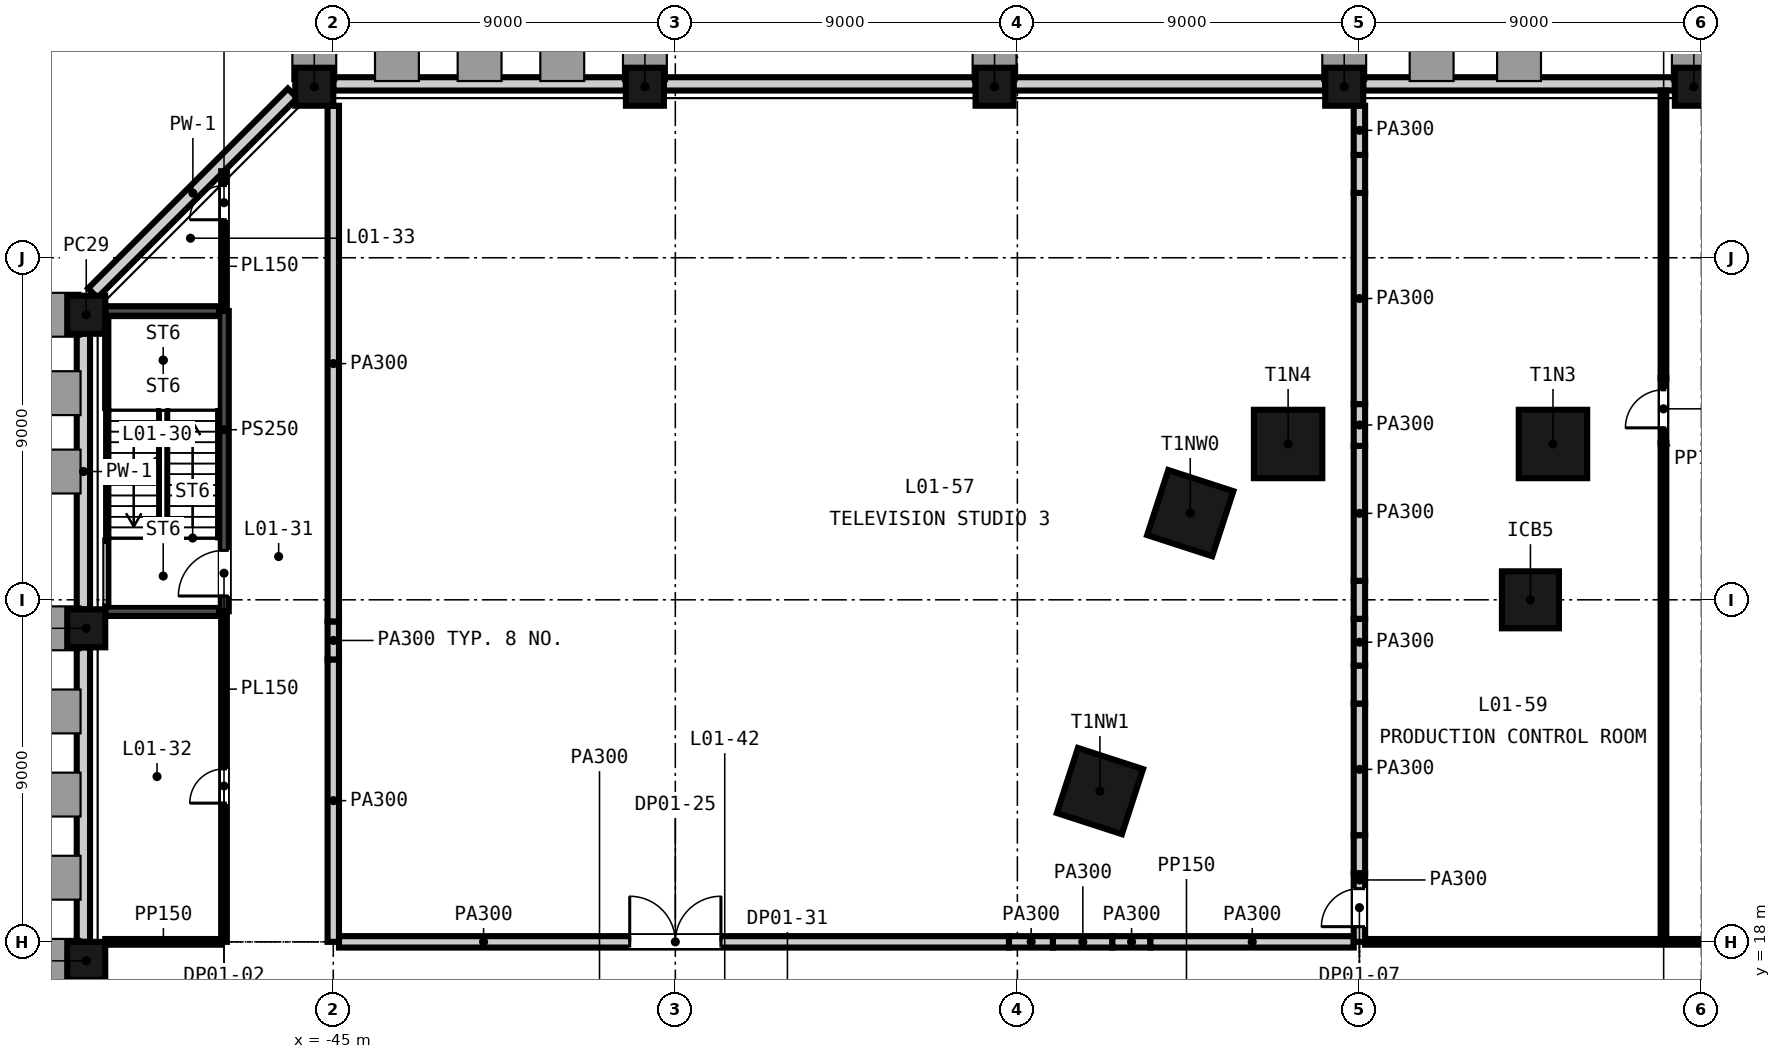
"""IFC4 building model, lengths in metres.
Left out: names, types, materials, properties, quantities, classifications, styles, units other than length and angle.
Written with IfcOpenShell. Run it as: python <this file> out.ifc"""

import sys

from ifc_helpers import new_model, si_unit, direction, frame, frame_2d, origin, origin_2d, place, context, subcontext, project, spatial, rectangle, extrude, element, fill, save


model = new_model("IFC4")
c1 = context("Model", 3, precision=1e-05, world=origin(), true_north=direction((0.0, 1.0)))
c2 = subcontext(c1, "Body", "Model", "MODEL_VIEW")
j1 = project(units=[si_unit("LENGTHUNIT", "METRE"), si_unit("PLANEANGLEUNIT", "RADIAN")], contexts=[c1])
p1 = place(None, origin())
s1 = spatial("IfcSite", under=j1, at=p1, CompositionType="ELEMENT")
p2 = place(p1, origin())
s2 = spatial("IfcBuilding", under=s1, at=p2, CompositionType="ELEMENT")
p3 = place(p2, frame((0.0, 0.0, 9.0)))
s3 = spatial("IfcBuildingStorey", under=s2, at=p3, CompositionType="ELEMENT", Elevation=9.0)
for number, where, z_axis, x_axis in (
    (1, (-12.907, 31.1, -0.4), (0.0, 0.0, 1.0), (-1.0, 0.0, 0.0)),
    (2, (-19.876, 31.1, -0.4), (0.0, 0.0, 1.0), (-1.0, 0.0, 0.0)),
    (3, (-22.451, 29.281, -0.4), (0.0, 0.0, 1.0), (-0.309, -0.951, 0.0)),
    (4, (-24.827, 21.968, -0.4), (0.0, 0.0, 1.0), (-0.309, -0.951, 0.0)),
):
    element("IfcColumn", number, at=place(p3, frame(where, z_axis=z_axis, x_axis=x_axis)), inside=s3, PredefinedType="COLUMN", context=c2, shape_type="SweptSolid", body=[
        extrude(rectangle(XDim=1.8, YDim=1.8, at=origin_2d()), origin(), (0.0, 0.0, 1.0), 9.0),
    ])
p4 = place(p3, frame((-13.5, 27.0, -0.4), z_axis=(0.0, 0.0, 1.0), x_axis=(1.0, 0.0, 0.0)))
e5 = element("IfcColumn", 5, at=p4, inside=s3, PredefinedType="COLUMN", context=c2, shape_type="SweptSolid", body=[
    extrude(rectangle(XDim=1.5, YDim=1.5, at=origin_2d()), origin(), (0.0, 0.0, 1.0), 9.0),
])
for number, where, z_axis, x_axis in (
    (6, (-9.2, 40.5, -0.4), (0.0, 0.0, 1.0), (-1.0, 0.0, 0.0)),
    (7, (-18.4, 40.5, -0.4), (0.0, 0.0, 1.0), (-1.0, 0.0, 0.0)),
    (8, (-27.6, 40.5, -0.4), (0.0, 0.0, 1.0), (-1.0, 0.0, 0.0)),
    (9, (-36.8, 40.5, -0.4), (0.0, 0.0, 1.0), (-1.0, 0.0, 0.0)),
    (10, (-45.5, 40.5, -0.4), (0.0, 0.0, 1.0), (-1.0, 0.0, 0.0)),
    (11, (-51.5, 34.5, -0.4), (0.0, 0.0, 1.0), (0.0, -1.0, 0.0)),
    (12, (-51.5, 26.25, -0.4), (0.0, 0.0, 1.0), (0.0, -1.0, 0.0)),
    (13, (-51.5, 17.5, -0.4), (0.0, 0.0, 1.0), (0.0, -1.0, 0.0)),
):
    element("IfcColumn", number, at=place(p3, frame(where, z_axis=z_axis, x_axis=x_axis)), inside=s3, PredefinedType="COLUMN", context=c2, shape_type="SweptSolid", body=[
        extrude(rectangle(XDim=1.0, YDim=1.0, at=origin_2d()), origin(), (0.0, 0.0, 1.0), 9.0),
    ])
p5 = place(p3, frame((-9.7, 40.575, -0.4), z_axis=(0.0, 0.0, 1.0), x_axis=(-1.0, 0.0, 0.0)))
e14 = element("IfcWall", 14, at=p5, inside=s3, PredefinedType="SOLIDWALL", context=c2, shape_type="SweptSolid", body=[
    extrude(rectangle(XDim=8.2, YDim=0.35, at=frame_2d((4.1, 0.0))), origin(), (0.0, 0.0, 1.0), 8.1),
])
p6 = place(p3, frame((-18.9, 40.575, -0.4), z_axis=(0.0, 0.0, 1.0), x_axis=(-1.0, 0.0, 0.0)))
e15 = element("IfcWall", 15, at=p6, inside=s3, PredefinedType="SOLIDWALL", context=c2, shape_type="SweptSolid", body=[
    extrude(rectangle(XDim=8.2, YDim=0.35, at=frame_2d((4.1, 0.0))), origin(), (0.0, 0.0, 1.0), 8.1),
])
p7 = place(p3, frame((-28.1, 40.575, -0.4), z_axis=(0.0, 0.0, 1.0), x_axis=(-1.0, 0.0, 0.0)))
e16 = element("IfcWall", 16, at=p7, inside=s3, PredefinedType="SOLIDWALL", context=c2, shape_type="SweptSolid", body=[
    extrude(rectangle(XDim=8.2, YDim=0.35, at=frame_2d((4.1, 0.0))), origin(), (0.0, 0.0, 1.0), 8.1),
])
p8 = place(p3, frame((-37.3, 40.575, -0.4), z_axis=(0.0, 0.0, 1.0), x_axis=(-1.0, 0.0, 0.0)))
e17 = element("IfcWall", 17, at=p8, inside=s3, PredefinedType="SOLIDWALL", context=c2, shape_type="SweptSolid", body=[
    extrude(rectangle(XDim=7.7, YDim=0.35, at=frame_2d((3.85, 0.0))), origin(), (0.0, 0.0, 1.0), 8.1),
])
p9 = place(p3, frame((-46.072, 40.327, -0.4), z_axis=(0.0, 0.0, 1.0), x_axis=(-0.707106781187, -0.707106781187, 0.0)))
e18 = element("IfcWall", 18, at=p9, inside=s3, PredefinedType="SOLIDWALL", context=c2, shape_type="SweptSolid", body=[
    extrude(rectangle(XDim=7.433, YDim=0.35, at=frame_2d((3.716, 0.0))), origin(), (0.0, 0.0, 1.0), 8.1),
])
p10 = place(p3, frame((-51.575, 34.0, -0.4), z_axis=(0.0, 0.0, 1.0), x_axis=(0.0, -1.0, 0.0)))
e19 = element("IfcWall", 19, at=p10, inside=s3, PredefinedType="SOLIDWALL", context=c2, shape_type="SweptSolid", body=[
    extrude(rectangle(XDim=7.25, YDim=0.35, at=frame_2d((3.625, 0.0))), origin(), (0.0, 0.0, 1.0), 8.1),
])
p11 = place(p3, frame((-51.575, 25.75, -0.4), z_axis=(0.0, 0.0, 1.0), x_axis=(0.0, -1.0, 0.0)))
e20 = element("IfcWall", 20, at=p11, inside=s3, PredefinedType="SOLIDWALL", context=c2, shape_type="SweptSolid", body=[
    extrude(rectangle(XDim=7.75, YDim=0.35, at=frame_2d((3.875, 0.0))), origin(), (0.0, 0.0, 1.0), 8.1),
])
p12 = place(p3, frame((-51.0, 18.0, 0.0), z_axis=(0.0, 0.0, 1.0), x_axis=(1.0, 0.0, 0.0)))
e21 = element("IfcWall", 21, at=p12, inside=s3, PredefinedType="PARTITIONING", context=c2, shape_type="SweptSolid", body=[
    extrude(rectangle(XDim=3.05, YDim=0.15, at=frame_2d((1.525, 0.0))), origin(), (0.0, 0.0, 1.0), 8.6),
])
p13 = place(p3, frame((-44.85, 18.0, 0.0), z_axis=(0.0, 0.0, 1.0), x_axis=(1.0, 0.0, 0.0)))
e22 = element("IfcWall", 22, at=p13, inside=s3, PredefinedType="PARTITIONING", context=c2, shape_type="SweptSolid", body=[
    extrude(rectangle(XDim=17.629, YDim=0.3, at=frame_2d((8.815, 0.0))), origin(), (0.0, 0.0, 1.0), 8.6),
])
p14 = place(p13, frame((7.65, 0.0, 0.0)))
e23 = element("IfcOpeningElement", 23, at=p14, cuts=e22, PredefinedType="OPENING", context=c2, shape_type="SweptSolid", body=[
    extrude(rectangle(XDim=2.4, YDim=2.4, at=frame_2d((1.2, 1.2))), frame((0.0, 0.16, 0.0), z_axis=(0.0, -1.0, 0.0), x_axis=(1.0, 0.0, 0.0)), (0.0, 0.0, 1.0), 0.32),
])
p15 = place(p3, frame((-27.221, 18.0, 0.0), z_axis=(0.0, 0.0, 1.0), x_axis=(1.0, 0.0, 0.0)))
e24 = element("IfcWall", 24, at=p15, inside=s3, PredefinedType="PARTITIONING", context=c2, shape_type="SweptSolid", body=[
    extrude(rectangle(XDim=1.156, YDim=0.3, at=frame_2d((0.578, 0.0))), origin(), (0.0, 0.0, 1.0), 7.6),
])
p16 = place(p3, frame((-26.064, 18.0, 0.0), z_axis=(0.0, 0.0, 1.0), x_axis=(1.0, 0.0, 0.0)))
e25 = element("IfcWall", 25, at=p16, inside=s3, PredefinedType="PARTITIONING", context=c2, shape_type="SweptSolid", body=[
    extrude(rectangle(XDim=1.564, YDim=0.3, at=frame_2d((0.782, 0.0))), origin(), (0.0, 0.0, 1.0), 8.6),
])
p17 = place(p3, frame((-24.5, 18.0, 0.0), z_axis=(0.0, 0.0, 1.0), x_axis=(1.0, 0.0, 0.0)))
e26 = element("IfcWall", 26, at=p17, inside=s3, PredefinedType="PARTITIONING", context=c2, shape_type="SweptSolid", body=[
    extrude(rectangle(XDim=1.0, YDim=0.3, at=frame_2d((0.5, 0.0))), origin(), (0.0, 0.0, 1.0), 7.997),
])
p18 = place(p3, frame((-23.5, 18.0, 0.0), z_axis=(0.0, 0.0, 1.0), x_axis=(1.0, 0.0, 0.0)))
e27 = element("IfcWall", 27, at=p18, inside=s3, PredefinedType="PARTITIONING", context=c2, shape_type="SweptSolid", body=[
    extrude(rectangle(XDim=5.35, YDim=0.3, at=frame_2d((2.675, 0.0))), origin(), (0.0, 0.0, 1.0), 8.6),
])
p19 = place(p3, frame((-17.85, 18.0, 0.0), z_axis=(0.0, 0.0, 1.0), x_axis=(1.0, 0.0, 0.0)))
e28 = element("IfcWall", 28, at=p19, inside=s3, PredefinedType="PARTITIONING", context=c2, shape_type="SweptSolid", body=[
    extrude(rectangle(XDim=35.7, YDim=0.15, at=frame_2d((17.85, 0.0))), origin(), (0.0, 0.0, 1.0), 8.6),
])
p20 = place(p19, frame((17.25, 0.0, 0.0)))
e29 = element("IfcOpeningElement", 29, at=p20, cuts=e28, PredefinedType="OPENING", context=c2, shape_type="SweptSolid", body=[
    extrude(rectangle(XDim=1.0, YDim=2.1, at=frame_2d((0.5, 1.05))), frame((0.0, 0.085, 0.0), z_axis=(0.0, -1.0, 0.0), x_axis=(1.0, 0.0, 0.0)), (0.0, 0.0, 1.0), 0.17),
])
for number, where, z_axis, x_axis in (
    (30, (-51.0, 26.7, 0.0), (0.0, 0.0, 1.0), (1.0, 0.0, 0.0)),
    (31, (-51.0, 34.6, 0.0), (0.0, 0.0, 1.0), (1.0, 0.0, 0.0)),
):
    element("IfcWall", number, at=place(p3, frame(where, z_axis=z_axis, x_axis=x_axis)), inside=s3, PredefinedType="SHEAR", context=c2, shape_type="SweptSolid", body=[
        extrude(rectangle(XDim=3.0, YDim=0.25, at=frame_2d((1.5, 0.0))), origin(), (0.0, 0.0, 1.0), 8.6),
    ])
p21 = place(p3, frame((-47.875, 18.0, 0.0), z_axis=(0.0, 0.0, 1.0), x_axis=(0.0, 1.0, 0.0)))
e32 = element("IfcWall", 32, at=p21, inside=s3, PredefinedType="PARTITIONING", context=c2, shape_type="SweptSolid", body=[
    extrude(rectangle(XDim=8.7, YDim=0.15, at=frame_2d((4.35, 0.0))), origin(), (0.0, 0.0, 1.0), 8.6),
])
p22 = place(p21, frame((3.65, 0.0, 0.0)))
e33 = element("IfcOpeningElement", 33, at=p22, cuts=e32, PredefinedType="OPENING", context=c2, shape_type="SweptSolid", body=[
    extrude(rectangle(XDim=0.9, YDim=2.1, at=frame_2d((0.45, 1.05))), frame((0.0, 0.085, 0.0), z_axis=(0.0, -1.0, 0.0), x_axis=(1.0, 0.0, 0.0)), (0.0, 0.0, 1.0), 0.17),
])
p23 = place(p3, frame((-47.875, 26.7, 0.0), z_axis=(0.0, 0.0, 1.0), x_axis=(0.0, 1.0, 0.0)))
e34 = element("IfcWall", 34, at=p23, inside=s3, PredefinedType="SHEAR", context=c2, shape_type="SweptSolid", body=[
    extrude(rectangle(XDim=7.9, YDim=0.25, at=frame_2d((3.95, 0.0))), origin(), (0.0, 0.0, 1.0), 8.6),
])
p24 = place(p23, frame((0.4, 0.0, 0.0)))
e35 = element("IfcOpeningElement", 35, at=p24, cuts=e34, PredefinedType="OPENING", context=c2, shape_type="SweptSolid", body=[
    extrude(rectangle(XDim=1.2, YDim=2.1, at=frame_2d((0.6, 1.05))), frame((0.0, 0.135, 0.0), z_axis=(0.0, -1.0, 0.0), x_axis=(1.0, 0.0, 0.0)), (0.0, 0.0, 1.0), 0.27),
])
p25 = place(p3, frame((-47.875, 34.6, 0.0), z_axis=(0.0, 0.0, 1.0), x_axis=(0.0, 1.0, 0.0)))
e36 = element("IfcWall", 36, at=p25, inside=s3, PredefinedType="PARTITIONING", context=c2, shape_type="SweptSolid", body=[
    extrude(rectangle(XDim=3.677, YDim=0.15, at=frame_2d((1.838, 0.0))), origin(), (0.0, 0.0, 1.0), 8.067),
])
p26 = place(p25, frame((2.4, 0.0, 0.0)))
e37 = element("IfcOpeningElement", 37, at=p26, cuts=e36, PredefinedType="OPENING", context=c2, shape_type="SweptSolid", body=[
    extrude(rectangle(XDim=0.9, YDim=2.1, at=frame_2d((0.45, 1.05))), frame((0.0, 0.085, 0.0), z_axis=(0.0, -1.0, 0.0), x_axis=(1.0, 0.0, 0.0)), (0.0, 0.0, 1.0), 0.17),
])
p27 = place(p3, frame((-45.0, 18.0, 0.0), z_axis=(0.0, 0.0, 1.0), x_axis=(0.0, 1.0, 0.0)))
e38 = element("IfcWall", 38, at=p27, inside=s3, PredefinedType="PARTITIONING", context=c2, shape_type="SweptSolid", body=[
    extrude(rectangle(XDim=7.431, YDim=0.3, at=frame_2d((3.715, 0.0))), origin(), (0.0, 0.0, 1.0), 8.6),
])
p28 = place(p3, frame((-45.0, 25.431, 0.0), z_axis=(0.0, 0.0, 1.0), x_axis=(0.0, 1.0, 0.0)))
e39 = element("IfcWall", 39, at=p28, inside=s3, PredefinedType="PARTITIONING", context=c2, shape_type="SweptSolid", body=[
    extrude(rectangle(XDim=1.0, YDim=0.3, at=frame_2d((0.5, 0.0))), origin(), (0.0, 0.0, 1.0), 7.511),
])
p29 = place(p3, frame((-45.0, 26.431, 0.0), z_axis=(0.0, 0.0, 1.0), x_axis=(0.0, 1.0, 0.0)))
e40 = element("IfcWall", 40, at=p29, inside=s3, PredefinedType="PARTITIONING", context=c2, shape_type="SweptSolid", body=[
    extrude(rectangle(XDim=13.569, YDim=0.3, at=frame_2d((6.785, 0.0))), origin(), (0.0, 0.0, 1.0), 8.6),
])
p30 = place(p3, frame((-18.0, 18.0, 0.0), z_axis=(0.0, 0.0, 1.0), x_axis=(0.0, 1.0, 0.0)))
e41 = element("IfcWall", 41, at=p30, inside=s3, PredefinedType="PARTITIONING", context=c2, shape_type="SweptSolid", body=[
    extrude(rectangle(XDim=1.807, YDim=0.3, at=frame_2d((0.904, 0.0))), origin(), (0.0, 0.0, 1.0), 8.6),
])
p31 = place(p30, frame((0.4, 0.0, 0.0)))
e42 = element("IfcOpeningElement", 42, at=p31, cuts=e41, PredefinedType="OPENING", context=c2, shape_type="SweptSolid", body=[
    extrude(rectangle(XDim=1.0, YDim=2.1, at=frame_2d((0.5, 1.05))), frame((0.0, 0.16, 0.0), z_axis=(0.0, -1.0, 0.0), x_axis=(1.0, 0.0, 0.0)), (0.0, 0.0, 1.0), 0.32),
])
p32 = place(p3, frame((-18.0, 19.807, 0.0), z_axis=(0.0, 0.0, 1.0), x_axis=(0.0, 1.0, 0.0)))
e43 = element("IfcWall", 43, at=p32, inside=s3, PredefinedType="PARTITIONING", context=c2, shape_type="SweptSolid", body=[
    extrude(rectangle(XDim=1.0, YDim=0.3, at=frame_2d((0.5, 0.0))), origin(), (0.0, 0.0, 1.0), 7.921),
])
p33 = place(p3, frame((-18.0, 20.807, 0.0), z_axis=(0.0, 0.0, 1.0), x_axis=(0.0, 1.0, 0.0)))
e44 = element("IfcWall", 44, at=p33, inside=s3, PredefinedType="PARTITIONING", context=c2, shape_type="SweptSolid", body=[
    extrude(rectangle(XDim=3.462, YDim=0.3, at=frame_2d((1.731, 0.0))), origin(), (0.0, 0.0, 1.0), 8.6),
])
p34 = place(p3, frame((-18.0, 24.269, 0.0), z_axis=(0.0, 0.0, 1.0), x_axis=(0.0, 1.0, 0.0)))
e45 = element("IfcWall", 45, at=p34, inside=s3, PredefinedType="PARTITIONING", context=c2, shape_type="SweptSolid", body=[
    extrude(rectangle(XDim=1.0, YDim=0.3, at=frame_2d((0.5, 0.0))), origin(), (0.0, 0.0, 1.0), 7.921),
])
p35 = place(p3, frame((-18.0, 25.269, 0.0), z_axis=(0.0, 0.0, 1.0), x_axis=(0.0, 1.0, 0.0)))
e46 = element("IfcWall", 46, at=p35, inside=s3, PredefinedType="PARTITIONING", context=c2, shape_type="SweptSolid", body=[
    extrude(rectangle(XDim=1.231, YDim=0.3, at=frame_2d((0.615, 0.0))), origin(), (0.0, 0.0, 1.0), 8.6),
])
p36 = place(p3, frame((-18.0, 26.5, 0.0), z_axis=(0.0, 0.0, 1.0), x_axis=(0.0, 1.0, 0.0)))
e47 = element("IfcWall", 47, at=p36, inside=s3, PredefinedType="PARTITIONING", context=c2, shape_type="SweptSolid", body=[
    extrude(rectangle(XDim=1.0, YDim=0.3, at=frame_2d((0.5, 0.0))), origin(), (0.0, 0.0, 1.0), 7.994),
])
p37 = place(p3, frame((-18.0, 27.5, 0.0), z_axis=(0.0, 0.0, 1.0), x_axis=(0.0, 1.0, 0.0)))
e48 = element("IfcWall", 48, at=p37, inside=s3, PredefinedType="PARTITIONING", context=c2, shape_type="SweptSolid", body=[
    extrude(rectangle(XDim=3.55, YDim=0.3, at=frame_2d((1.775, 0.0))), origin(), (0.0, 0.0, 1.0), 8.6),
])
p38 = place(p3, frame((-18.0, 31.05, 0.0), z_axis=(0.0, 0.0, 1.0), x_axis=(0.0, 1.0, 0.0)))
e49 = element("IfcWall", 49, at=p38, inside=s3, PredefinedType="PARTITIONING", context=c2, shape_type="SweptSolid", body=[
    extrude(rectangle(XDim=1.1, YDim=0.3, at=frame_2d((0.55, 0.0))), origin(), (0.0, 0.0, 1.0), 7.6),
])
p39 = place(p3, frame((-18.0, 32.15, 0.0), z_axis=(0.0, 0.0, 1.0), x_axis=(0.0, 1.0, 0.0)))
e50 = element("IfcWall", 50, at=p39, inside=s3, PredefinedType="PARTITIONING", context=c2, shape_type="SweptSolid", body=[
    extrude(rectangle(XDim=5.555, YDim=0.3, at=frame_2d((2.778, 0.0))), origin(), (0.0, 0.0, 1.0), 8.6),
])
p40 = place(p3, frame((-18.0, 37.705, 0.0), z_axis=(0.0, 0.0, 1.0), x_axis=(0.0, 1.0, 0.0)))
e51 = element("IfcWall", 51, at=p40, inside=s3, PredefinedType="PARTITIONING", context=c2, shape_type="SweptSolid", body=[
    extrude(rectangle(XDim=1.0, YDim=0.3, at=frame_2d((0.5, 0.0))), origin(), (0.0, 0.0, 1.0), 7.841),
])
p41 = place(p3, frame((-18.0, 38.705, 0.0), z_axis=(0.0, 0.0, 1.0), x_axis=(0.0, 1.0, 0.0)))
e52 = element("IfcWall", 52, at=p41, inside=s3, PredefinedType="PARTITIONING", context=c2, shape_type="SweptSolid", body=[
    extrude(rectangle(XDim=1.295, YDim=0.3, at=frame_2d((0.647, 0.0))), origin(), (0.0, 0.0, 1.0), 8.6),
])
p42 = place(p3, frame((-10.0, 18.075, 0.0), z_axis=(0.0, 0.0, 1.0), x_axis=(0.0, 1.0, 0.0)))
e53 = element("IfcWall", 53, at=p42, inside=s3, PredefinedType="PARTITIONING", context=c2, shape_type="SweptSolid", body=[
    extrude(rectangle(XDim=13.05, YDim=0.15, at=frame_2d((6.525, 0.0))), origin(), (0.0, 0.0, 1.0), 8.6),
])
p43 = place(p3, frame((-10.0, 31.125, 0.0), z_axis=(0.0, 0.0, 1.0), x_axis=(0.0, 1.0, 0.0)))
e54 = element("IfcWall", 54, at=p43, inside=s3, PredefinedType="PARTITIONING", context=c2, shape_type="SweptSolid", body=[
    extrude(rectangle(XDim=1.708, YDim=0.15, at=frame_2d((0.854, 0.0))), origin(), (0.0, 0.0, 1.0), 7.6),
])
p44 = place(p43, frame((0.4, 0.0, 0.0)))
e55 = element("IfcOpeningElement", 55, at=p44, cuts=e54, PredefinedType="OPENING", context=c2, shape_type="SweptSolid", body=[
    extrude(rectangle(XDim=1.0, YDim=2.1, at=frame_2d((0.5, 1.05))), frame((0.0, 0.085, 0.0), z_axis=(0.0, -1.0, 0.0), x_axis=(1.0, 0.0, 0.0)), (0.0, 0.0, 1.0), 0.17),
])
p45 = place(p3, frame((-10.0, 32.833, 0.0), z_axis=(0.0, 0.0, 1.0), x_axis=(0.0, 1.0, 0.0)))
e56 = element("IfcWall", 56, at=p45, inside=s3, PredefinedType="PARTITIONING", context=c2, shape_type="SweptSolid", body=[
    extrude(rectangle(XDim=7.567, YDim=0.15, at=frame_2d((3.783, 0.0))), origin(), (0.0, 0.0, 1.0), 8.6),
])
p46 = place(p24, origin())
e57 = element("IfcDoor", 57, at=p46, inside=s3, OperationType="SINGLE_SWING_LEFT", PredefinedType="DOOR", context=c2, shape_type="SweptSolid", body=[
    extrude(rectangle(XDim=1.2, YDim=2.1, at=frame_2d((0.6, 1.05))), frame((0.0, 0.025, 0.0), z_axis=(0.0, -1.0, 0.0), x_axis=(1.0, 0.0, 0.0)), (0.0, 0.0, 1.0), 0.05),
])
fill(e35, e57)
p47 = place(p22, origin())
e58 = element("IfcDoor", 58, at=p47, inside=s3, OperationType="SINGLE_SWING_LEFT", PredefinedType="DOOR", context=c2, shape_type="SweptSolid", body=[
    extrude(rectangle(XDim=0.9, YDim=2.1, at=frame_2d((0.45, 1.05))), frame((0.0, 0.025, 0.0), z_axis=(0.0, -1.0, 0.0), x_axis=(1.0, 0.0, 0.0)), (0.0, 0.0, 1.0), 0.05),
])
fill(e33, e58)
p48 = place(p26, origin())
e59 = element("IfcDoor", 59, at=p48, inside=s3, OperationType="SINGLE_SWING_LEFT", PredefinedType="DOOR", context=c2, shape_type="SweptSolid", body=[
    extrude(rectangle(XDim=0.9, YDim=2.1, at=frame_2d((0.45, 1.05))), frame((0.0, 0.025, 0.0), z_axis=(0.0, -1.0, 0.0), x_axis=(1.0, 0.0, 0.0)), (0.0, 0.0, 1.0), 0.05),
])
fill(e37, e59)
p49 = place(p31, origin())
e60 = element("IfcDoor", 60, at=p49, inside=s3, OperationType="SINGLE_SWING_LEFT", PredefinedType="DOOR", context=c2, shape_type="SweptSolid", body=[
    extrude(rectangle(XDim=1.0, YDim=2.1, at=frame_2d((0.5, 1.05))), frame((0.0, 0.025, 0.0), z_axis=(0.0, -1.0, 0.0), x_axis=(1.0, 0.0, 0.0)), (0.0, 0.0, 1.0), 0.05),
])
fill(e42, e60)
p50 = place(p44, origin())
e61 = element("IfcDoor", 61, at=p50, inside=s3, OperationType="SINGLE_SWING_LEFT", PredefinedType="DOOR", context=c2, shape_type="SweptSolid", body=[
    extrude(rectangle(XDim=1.0, YDim=2.1, at=frame_2d((0.5, 1.05))), frame((0.0, 0.025, 0.0), z_axis=(0.0, -1.0, 0.0), x_axis=(1.0, 0.0, 0.0)), (0.0, 0.0, 1.0), 0.05),
])
fill(e55, e61)
p51 = place(p14, origin())
e62 = element("IfcDoor", 62, at=p51, inside=s3, OperationType="SINGLE_SWING_LEFT", PredefinedType="DOOR", context=c2, shape_type="SweptSolid", body=[
    extrude(rectangle(XDim=2.4, YDim=2.4, at=frame_2d((1.2, 1.2))), frame((0.0, 0.025, 0.0), z_axis=(0.0, -1.0, 0.0), x_axis=(1.0, 0.0, 0.0)), (0.0, 0.0, 1.0), 0.05),
])
fill(e23, e62)
save(model, sys.argv[1])
